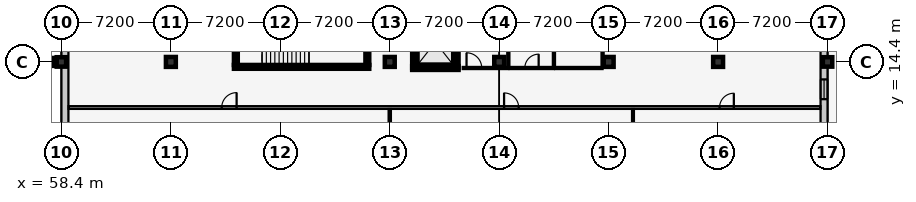
"""IFC4 building model, lengths in metres.
Left out: names, types, materials, properties, quantities, classifications, styles, units other than length and angle.
Written with IfcOpenShell. Run it as: python <this file> out.ifc"""

import sys

from ifc_helpers import new_model, si_unit, direction, frame, frame_2d, origin, origin_2d, place, context, subcontext, project, spatial, rectangle, extrude, element, fill, save


model = new_model("IFC4")
c1 = context("Model", 3, precision=1e-05, world=origin(), true_north=direction((0.0, 1.0)))
c2 = subcontext(c1, "Body", "Model", "MODEL_VIEW")
j1 = project(units=[si_unit("LENGTHUNIT", "METRE"), si_unit("PLANEANGLEUNIT", "RADIAN")], contexts=[c1])
p1 = place(None, origin())
s1 = spatial("IfcSite", under=j1, at=p1, CompositionType="ELEMENT")
p2 = place(p1, origin())
s2 = spatial("IfcBuilding", under=s1, at=p2, CompositionType="ELEMENT")
p3 = place(p2, frame((0.0, 0.0, 5.4)))
s3 = spatial("IfcBuildingStorey", under=s2, at=p3, CompositionType="ELEMENT", Elevation=5.4)
p4 = place(p3, frame((57.6, 14.4, 0.0), z_axis=(0.0, 0.0, 1.0), x_axis=(1.0, 0.0, 0.0)))
e1 = element("IfcColumn", 1, at=p4, inside=s3, PredefinedType="COLUMN", context=c2, shape_type="SweptSolid", body=[
    extrude(rectangle(XDim=0.52, YDim=0.52, at=origin_2d()), origin(), (0.0, 0.0, 1.0), 4.2),
])
p5 = place(p3, frame((58.4, 14.4, 0.0), z_axis=(0.0, 0.0, 1.0), x_axis=(1.0, 0.0, 0.0)))
e2 = element("IfcColumn", 2, at=p5, inside=s3, PredefinedType="COLUMN", context=c2, shape_type="SweptSolid", body=[
    extrude(rectangle(XDim=0.62, YDim=0.62, at=origin_2d()), origin(), (0.0, 0.0, 1.0), 4.2),
])
for number, where, z_axis, x_axis in (
    (3, (65.6, 14.4, 0.0), (0.0, 0.0, 1.0), (1.0, 0.0, 0.0)),
    (4, (80.0, 14.4, 0.0), (0.0, 0.0, 1.0), (1.0, 0.0, 0.0)),
    (5, (87.2, 14.4, 0.0), (0.0, 0.0, 1.0), (1.0, 0.0, 0.0)),
    (6, (94.4, 14.4, 0.0), (0.0, 0.0, 1.0), (1.0, 0.0, 0.0)),
    (7, (101.6, 14.4, 0.0), (0.0, 0.0, 1.0), (1.0, 0.0, 0.0)),
):
    element("IfcColumn", number, at=place(p3, frame(where, z_axis=z_axis, x_axis=x_axis)), inside=s3, PredefinedType="COLUMN", context=c2, shape_type="SweptSolid", body=[
        extrude(rectangle(XDim=0.65, YDim=0.65, at=origin_2d()), origin(), (0.0, 0.0, 1.0), 4.2),
    ])
p6 = place(p3, frame((108.8, 14.4, 0.0), z_axis=(0.0, 0.0, 1.0), x_axis=(1.0, 0.0, 0.0)))
e8 = element("IfcColumn", 8, at=p6, inside=s3, PredefinedType="COLUMN", context=c2, shape_type="SweptSolid", body=[
    extrude(rectangle(XDim=0.62, YDim=0.62, at=origin_2d()), origin(), (0.0, 0.0, 1.0), 4.2),
])
p7 = place(p3, frame((108.57, 21.6, 0.0), z_axis=(0.0, 0.0, 1.0), x_axis=(0.0, -1.0, 0.0)))
e9 = element("IfcWall", 9, at=p7, inside=s3, PredefinedType="SOLIDWALL", context=c2, shape_type="SweptSolid", body=[
    extrude(rectangle(XDim=21.6, YDim=0.46, at=frame_2d((10.8, 0.0))), origin(), (0.0, 0.0, 1.0), 3.215),
])
p8 = place(p7, frame((1.25, 0.0, 0.9)))
e10 = element("IfcOpeningElement", 10, at=p8, cuts=e9, PredefinedType="OPENING", context=c2, shape_type="SweptSolid", body=[
    extrude(rectangle(XDim=1.1, YDim=1.35, at=frame_2d((0.55, 0.675))), frame((0.0, 0.242, 0.0), z_axis=(0.0, -1.0, 0.0), x_axis=(1.0, 0.0, 0.0)), (0.0, 0.0, 1.0), 0.484),
])
p9 = place(p7, frame((4.8, 0.0, 0.9)))
e11 = element("IfcOpeningElement", 11, at=p9, cuts=e9, PredefinedType="OPENING", context=c2, shape_type="SweptSolid", body=[
    extrude(rectangle(XDim=1.2, YDim=1.35, at=frame_2d((0.6, 0.675))), frame((0.0, 0.242, 0.0), z_axis=(0.0, -1.0, 0.0), x_axis=(1.0, 0.0, 0.0)), (0.0, 0.0, 1.0), 0.484),
])
p10 = place(p7, frame((8.35, 0.0, 0.9)))
e12 = element("IfcOpeningElement", 12, at=p10, cuts=e9, PredefinedType="OPENING", context=c2, shape_type="SweptSolid", body=[
    extrude(rectangle(XDim=1.3, YDim=1.35, at=frame_2d((0.65, 0.675))), frame((0.0, 0.242, 0.0), z_axis=(0.0, -1.0, 0.0), x_axis=(1.0, 0.0, 0.0)), (0.0, 0.0, 1.0), 0.484),
])
p11 = place(p7, frame((11.9, 0.0, 0.9)))
e13 = element("IfcOpeningElement", 13, at=p11, cuts=e9, PredefinedType="OPENING", context=c2, shape_type="SweptSolid", body=[
    extrude(rectangle(XDim=1.4, YDim=1.35, at=frame_2d((0.7, 0.675))), frame((0.0, 0.242, 0.0), z_axis=(0.0, -1.0, 0.0), x_axis=(1.0, 0.0, 0.0)), (0.0, 0.0, 1.0), 0.484),
])
p12 = place(p7, frame((15.725, 0.0, 0.9)))
e14 = element("IfcOpeningElement", 14, at=p12, cuts=e9, PredefinedType="OPENING", context=c2, shape_type="SweptSolid", body=[
    extrude(rectangle(XDim=0.95, YDim=1.45, at=frame_2d((0.475, 0.725))), frame((0.0, 0.242, 0.0), z_axis=(0.0, -1.0, 0.0), x_axis=(1.0, 0.0, 0.0)), (0.0, 0.0, 1.0), 0.484),
])
p13 = place(p7, frame((19.275, 0.0, 0.9)))
e15 = element("IfcOpeningElement", 15, at=p13, cuts=e9, PredefinedType="OPENING", context=c2, shape_type="SweptSolid", body=[
    extrude(rectangle(XDim=1.05, YDim=1.45, at=frame_2d((0.525, 0.725))), frame((0.0, 0.242, 0.0), z_axis=(0.0, -1.0, 0.0), x_axis=(1.0, 0.0, 0.0)), (0.0, 0.0, 1.0), 0.484),
])
p14 = place(p3, frame((58.63, 0.0, 0.0), z_axis=(0.0, 0.0, 1.0), x_axis=(0.0, 1.0, 0.0)))
e16 = element("IfcWall", 16, at=p14, inside=s3, PredefinedType="SOLIDWALL", context=c2, shape_type="SweptSolid", body=[
    extrude(rectangle(XDim=21.6, YDim=0.46, at=frame_2d((10.8, 0.0))), origin(), (0.0, 0.0, 1.0), 3.205),
])
p15 = place(p14, frame((1.225, 0.0, 0.9)))
e17 = element("IfcOpeningElement", 17, at=p15, cuts=e16, PredefinedType="OPENING", context=c2, shape_type="SweptSolid", body=[
    extrude(rectangle(XDim=1.15, YDim=1.45, at=frame_2d((0.575, 0.725))), frame((0.0, 0.242, 0.0), z_axis=(0.0, -1.0, 0.0), x_axis=(1.0, 0.0, 0.0)), (0.0, 0.0, 1.0), 0.484),
])
p16 = place(p14, frame((4.775, 0.0, 0.9)))
e18 = element("IfcOpeningElement", 18, at=p16, cuts=e16, PredefinedType="OPENING", context=c2, shape_type="SweptSolid", body=[
    extrude(rectangle(XDim=1.25, YDim=1.45, at=frame_2d((0.625, 0.725))), frame((0.0, 0.242, 0.0), z_axis=(0.0, -1.0, 0.0), x_axis=(1.0, 0.0, 0.0)), (0.0, 0.0, 1.0), 0.484),
])
p17 = place(p14, frame((8.325, 0.0, 0.9)))
e19 = element("IfcOpeningElement", 19, at=p17, cuts=e16, PredefinedType="OPENING", context=c2, shape_type="SweptSolid", body=[
    extrude(rectangle(XDim=1.35, YDim=1.45, at=frame_2d((0.675, 0.725))), frame((0.0, 0.242, 0.0), z_axis=(0.0, -1.0, 0.0), x_axis=(1.0, 0.0, 0.0)), (0.0, 0.0, 1.0), 0.484),
])
p18 = place(p14, frame((15.75, 0.0, 0.9)))
e20 = element("IfcOpeningElement", 20, at=p18, cuts=e16, PredefinedType="OPENING", context=c2, shape_type="SweptSolid", body=[
    extrude(rectangle(XDim=0.9, YDim=1.6, at=frame_2d((0.45, 0.8))), frame((0.0, 0.242, 0.0), z_axis=(0.0, -1.0, 0.0), x_axis=(1.0, 0.0, 0.0)), (0.0, 0.0, 1.0), 0.484),
])
p19 = place(p14, frame((19.275, 0.0, 0.9)))
e21 = element("IfcOpeningElement", 21, at=p19, cuts=e16, PredefinedType="OPENING", context=c2, shape_type="SweptSolid", body=[
    extrude(rectangle(XDim=1.05, YDim=1.6, at=frame_2d((0.525, 0.8))), frame((0.0, 0.242, 0.0), z_axis=(0.0, -1.0, 0.0), x_axis=(1.0, 0.0, 0.0)), (0.0, 0.0, 1.0), 0.484),
])
p20 = place(p3, frame((69.75, 14.075, 0.0), z_axis=(0.0, 0.0, 1.0), x_axis=(1.0, 0.0, 0.0)))
e22 = element("IfcWall", 22, at=p20, inside=s3, PredefinedType="SHEAR", context=c2, shape_type="SweptSolid", body=[
    extrude(rectangle(XDim=8.9, YDim=0.25, at=frame_2d((4.45, 0.0))), origin(), (0.0, 0.0, 1.0), 3.95),
])
p21 = place(p3, frame((69.875, 17.65, 0.0), z_axis=(0.0, 0.0, 1.0), x_axis=(0.0, -1.0, 0.0)))
e23 = element("IfcWall", 23, at=p21, inside=s3, PredefinedType="SHEAR", context=c2, shape_type="SweptSolid", body=[
    extrude(rectangle(XDim=3.45, YDim=0.25, at=frame_2d((1.725, 0.0))), origin(), (0.0, 0.0, 1.0), 3.95),
])
p22 = place(p21, frame((1.15, 0.0, 0.0)))
e24 = element("IfcOpeningElement", 24, at=p22, cuts=e23, PredefinedType="OPENING", context=c2, shape_type="SweptSolid", body=[
    extrude(rectangle(XDim=1.15, YDim=2.15, at=frame_2d((0.575, 1.075))), frame((0.0, 0.137, 0.0), z_axis=(0.0, -1.0, 0.0), x_axis=(1.0, 0.0, 0.0)), (0.0, 0.0, 1.0), 0.274),
])
p23 = place(p3, frame((78.525, 14.2, 0.0), z_axis=(0.0, 0.0, 1.0), x_axis=(0.0, 1.0, 0.0)))
e25 = element("IfcWall", 25, at=p23, inside=s3, PredefinedType="SHEAR", context=c2, shape_type="SweptSolid", body=[
    extrude(rectangle(XDim=3.45, YDim=0.25, at=frame_2d((1.725, 0.0))), origin(), (0.0, 0.0, 1.0), 3.95),
])
p24 = place(p3, frame((81.475, 14.0, 0.0), z_axis=(0.0, 0.0, 1.0), x_axis=(1.0, 0.0, 0.0)))
e26 = element("IfcWall", 26, at=p24, inside=s3, PredefinedType="SHEAR", context=c2, shape_type="SweptSolid", body=[
    extrude(rectangle(XDim=3.05, YDim=0.25, at=frame_2d((1.525, 0.0))), origin(), (0.0, 0.0, 1.0), 3.95),
])
p25 = place(p24, frame((0.725, 0.0, 0.0)))
e27 = element("IfcOpeningElement", 27, at=p25, cuts=e26, PredefinedType="OPENING", context=c2, shape_type="SweptSolid", body=[
    extrude(rectangle(XDim=1.6, YDim=2.3, at=frame_2d((0.8, 1.15))), frame((0.0, 0.137, 0.0), z_axis=(0.0, -1.0, 0.0), x_axis=(1.0, 0.0, 0.0)), (0.0, 0.0, 1.0), 0.274),
])
for number, where, z_axis, x_axis in (
    (28, (81.6, 17.4, 0.0), (0.0, 0.0, 1.0), (0.0, -1.0, 0.0)),
    (29, (84.4, 14.0, 0.0), (0.0, 0.0, 1.0), (0.0, 1.0, 0.0)),
):
    element("IfcWall", number, at=place(p3, frame(where, z_axis=z_axis, x_axis=x_axis)), inside=s3, PredefinedType="SHEAR", context=c2, shape_type="SweptSolid", body=[
        extrude(rectangle(XDim=3.4, YDim=0.25, at=frame_2d((1.7, 0.0))), origin(), (0.0, 0.0, 1.0), 3.95),
    ])
p26 = place(p3, frame((58.87, 11.4, 0.0), z_axis=(0.0, 0.0, 1.0), x_axis=(1.0, 0.0, 0.0)))
e30 = element("IfcWall", 30, at=p26, inside=s3, PredefinedType="PARTITIONING", context=c2, shape_type="SweptSolid", body=[
    extrude(rectangle(XDim=49.46, YDim=0.18, at=frame_2d((24.73, 0.0))), origin(), (0.0, 0.0, 1.0), 3.95),
])
p27 = place(p26, frame((10.075, 0.0, 0.0)))
e31 = element("IfcOpeningElement", 31, at=p27, cuts=e30, PredefinedType="OPENING", context=c2, shape_type="SweptSolid", body=[
    extrude(rectangle(XDim=0.98, YDim=2.12, at=frame_2d((0.49, 1.06))), frame((0.0, 0.102, 0.0), z_axis=(0.0, -1.0, 0.0), x_axis=(1.0, 0.0, 0.0)), (0.0, 0.0, 1.0), 0.204),
])
p28 = place(p26, frame((28.65, 0.0, 0.0)))
e32 = element("IfcOpeningElement", 32, at=p28, cuts=e30, PredefinedType="OPENING", context=c2, shape_type="SweptSolid", body=[
    extrude(rectangle(XDim=0.96, YDim=2.1, at=frame_2d((0.48, 1.05))), frame((0.0, 0.102, 0.0), z_axis=(0.0, -1.0, 0.0), x_axis=(1.0, 0.0, 0.0)), (0.0, 0.0, 1.0), 0.204),
])
p29 = place(p26, frame((42.825, 0.0, 0.0)))
e33 = element("IfcOpeningElement", 33, at=p29, cuts=e30, PredefinedType="OPENING", context=c2, shape_type="SweptSolid", body=[
    extrude(rectangle(XDim=0.94, YDim=2.1, at=frame_2d((0.47, 1.05))), frame((0.0, 0.102, 0.0), z_axis=(0.0, -1.0, 0.0), x_axis=(1.0, 0.0, 0.0)), (0.0, 0.0, 1.0), 0.204),
])
p30 = place(p3, frame((80.0, 0.47, 0.0), z_axis=(0.0, 0.0, 1.0), x_axis=(0.0, 1.0, 0.0)))
e34 = element("IfcWall", 34, at=p30, inside=s3, PredefinedType="PARTITIONING", context=c2, shape_type="SweptSolid", body=[
    extrude(rectangle(XDim=10.83, YDim=0.15, at=frame_2d((5.415, 0.0))), origin(), (0.0, 0.0, 1.0), 3.325),
])
p31 = place(p3, frame((96.0, 0.47, 0.0), z_axis=(0.0, 0.0, 1.0), x_axis=(0.0, 1.0, 0.0)))
e35 = element("IfcWall", 35, at=p31, inside=s3, PredefinedType="PARTITIONING", context=c2, shape_type="SweptSolid", body=[
    extrude(rectangle(XDim=10.83, YDim=0.125, at=frame_2d((5.415, 0.0))), origin(), (0.0, 0.0, 1.0), 3.95),
])
p32 = place(p3, frame((84.8, 14.0, 0.0), z_axis=(0.0, 0.0, 1.0), x_axis=(1.0, 0.0, 0.0)))
e36 = element("IfcWall", 36, at=p32, inside=s3, PredefinedType="PARTITIONING", context=c2, shape_type="SweptSolid", body=[
    extrude(rectangle(XDim=3.0, YDim=0.14, at=frame_2d((1.5, 0.0))), origin(), (0.0, 0.0, 1.0), 3.95),
])
p33 = place(p32, frame((0.25, 0.0, 0.0)))
e37 = element("IfcOpeningElement", 37, at=p33, cuts=e36, PredefinedType="OPENING", context=c2, shape_type="SweptSolid", body=[
    extrude(rectangle(XDim=1.0, YDim=2.1, at=frame_2d((0.5, 1.05))), frame((0.0, 0.082, 0.0), z_axis=(0.0, -1.0, 0.0), x_axis=(1.0, 0.0, 0.0)), (0.0, 0.0, 1.0), 0.164),
])
p34 = place(p3, frame((87.8, 14.08, 0.0), z_axis=(0.0, 0.0, 1.0), x_axis=(0.0, 1.0, 0.0)))
e38 = element("IfcWall", 38, at=p34, inside=s3, PredefinedType="PARTITIONING", context=c2, shape_type="SweptSolid", body=[
    extrude(rectangle(XDim=7.105, YDim=0.14, at=frame_2d((3.552, 0.0))), origin(), (0.0, 0.0, 1.0), 3.95),
])
p35 = place(p3, frame((87.88, 14.0, 0.0), z_axis=(0.0, 0.0, 1.0), x_axis=(1.0, 0.0, 0.0)))
e39 = element("IfcWall", 39, at=p35, inside=s3, PredefinedType="PARTITIONING", context=c2, shape_type="SweptSolid", body=[
    extrude(rectangle(XDim=2.92, YDim=0.14, at=frame_2d((1.46, 0.0))), origin(), (0.0, 0.0, 1.0), 3.95),
])
p36 = place(p35, frame((1.005, 0.0, 0.0)))
e40 = element("IfcOpeningElement", 40, at=p36, cuts=e39, PredefinedType="OPENING", context=c2, shape_type="SweptSolid", body=[
    extrude(rectangle(XDim=0.91, YDim=2.06, at=frame_2d((0.455, 1.03))), frame((0.0, 0.082, 0.0), z_axis=(0.0, -1.0, 0.0), x_axis=(1.0, 0.0, 0.0)), (0.0, 0.0, 1.0), 0.164),
])
p37 = place(p3, frame((90.8, 14.08, 0.0), z_axis=(0.0, 0.0, 1.0), x_axis=(0.0, 1.0, 0.0)))
e41 = element("IfcWall", 41, at=p37, inside=s3, PredefinedType="PARTITIONING", context=c2, shape_type="SweptSolid", body=[
    extrude(rectangle(XDim=7.105, YDim=0.14, at=frame_2d((3.552, 0.0))), origin(), (0.0, 0.0, 1.0), 3.605),
])
p38 = place(p3, frame((90.88, 14.0, 0.0), z_axis=(0.0, 0.0, 1.0), x_axis=(1.0, 0.0, 0.0)))
e42 = element("IfcWall", 42, at=p38, inside=s3, PredefinedType="PARTITIONING", context=c2, shape_type="SweptSolid", body=[
    extrude(rectangle(XDim=3.12, YDim=0.14, at=frame_2d((1.56, 0.0))), origin(), (0.0, 0.0, 1.0), 3.95),
])
p39 = place(p3, frame((94.0, 14.08, 0.0), z_axis=(0.0, 0.0, 1.0), x_axis=(0.0, 1.0, 0.0)))
e43 = element("IfcWall", 43, at=p39, inside=s3, PredefinedType="PARTITIONING", context=c2, shape_type="SweptSolid", body=[
    extrude(rectangle(XDim=7.105, YDim=0.14, at=frame_2d((3.552, 0.0))), origin(), (0.0, 0.0, 1.0), 3.95),
])
p40 = place(p39, frame((3.107, 0.0, 0.0)))
e44 = element("IfcOpeningElement", 44, at=p40, cuts=e43, PredefinedType="OPENING", context=c2, shape_type="SweptSolid", body=[
    extrude(rectangle(XDim=0.89, YDim=2.05, at=frame_2d((0.445, 1.025))), frame((0.0, 0.082, 0.0), z_axis=(0.0, -1.0, 0.0), x_axis=(1.0, 0.0, 0.0)), (0.0, 0.0, 1.0), 0.164),
])
p41 = place(p10, origin())
e45 = element("IfcWindow", 45, at=p41, inside=s3, PartitioningType="SINGLE_PANEL", PredefinedType="WINDOW", context=c2, shape_type="SweptSolid", body=[
    extrude(rectangle(XDim=1.3, YDim=1.35, at=frame_2d((0.65, 0.675))), frame((0.0, 0.03, 0.0), z_axis=(0.0, -1.0, 0.0), x_axis=(1.0, 0.0, 0.0)), (0.0, 0.0, 1.0), 0.06),
])
fill(e12, e45)
p42 = place(p25, origin())
e46 = element("IfcDoor", 46, at=p42, inside=s3, OperationType="DOUBLE_DOOR_SLIDING", PredefinedType="DOOR", context=c2, shape_type="SweptSolid", body=[
    extrude(rectangle(XDim=1.6, YDim=2.3, at=frame_2d((0.8, 1.15))), frame((0.0, 0.025, 0.0), z_axis=(0.0, -1.0, 0.0), x_axis=(1.0, 0.0, 0.0)), (0.0, 0.0, 1.0), 0.05),
])
fill(e27, e46)
p43 = place(p27, origin())
e47 = element("IfcDoor", 47, at=p43, inside=s3, OperationType="SINGLE_SWING_RIGHT", PredefinedType="DOOR", context=c2, shape_type="SweptSolid", body=[
    extrude(rectangle(XDim=0.98, YDim=2.12, at=frame_2d((0.49, 1.06))), frame((0.0, 0.025, 0.0), z_axis=(0.0, -1.0, 0.0), x_axis=(1.0, 0.0, 0.0)), (0.0, 0.0, 1.0), 0.05),
])
fill(e31, e47)
p44 = place(p28, origin())
e48 = element("IfcDoor", 48, at=p44, inside=s3, OperationType="SINGLE_SWING_LEFT", PredefinedType="DOOR", context=c2, shape_type="SweptSolid", body=[
    extrude(rectangle(XDim=0.96, YDim=2.1, at=frame_2d((0.48, 1.05))), frame((0.0, 0.025, 0.0), z_axis=(0.0, -1.0, 0.0), x_axis=(1.0, 0.0, 0.0)), (0.0, 0.0, 1.0), 0.05),
])
fill(e32, e48)
p45 = place(p29, origin())
e49 = element("IfcDoor", 49, at=p45, inside=s3, OperationType="SINGLE_SWING_RIGHT", PredefinedType="DOOR", context=c2, shape_type="SweptSolid", body=[
    extrude(rectangle(XDim=0.94, YDim=2.1, at=frame_2d((0.47, 1.05))), frame((0.0, 0.025, 0.0), z_axis=(0.0, -1.0, 0.0), x_axis=(1.0, 0.0, 0.0)), (0.0, 0.0, 1.0), 0.05),
])
fill(e33, e49)
p46 = place(p33, origin())
e50 = element("IfcDoor", 50, at=p46, inside=s3, OperationType="SINGLE_SWING_LEFT", PredefinedType="DOOR", context=c2, shape_type="SweptSolid", body=[
    extrude(rectangle(XDim=1.0, YDim=2.1, at=frame_2d((0.5, 1.05))), frame((0.0, 0.025, 0.0), z_axis=(0.0, -1.0, 0.0), x_axis=(1.0, 0.0, 0.0)), (0.0, 0.0, 1.0), 0.05),
])
fill(e37, e50)
p47 = place(p36, origin())
e51 = element("IfcDoor", 51, at=p47, inside=s3, OperationType="SINGLE_SWING_RIGHT", PredefinedType="DOOR", context=c2, shape_type="SweptSolid", body=[
    extrude(rectangle(XDim=0.91, YDim=2.06, at=frame_2d((0.455, 1.03))), frame((0.0, 0.025, 0.0), z_axis=(0.0, -1.0, 0.0), x_axis=(1.0, 0.0, 0.0)), (0.0, 0.0, 1.0), 0.05),
])
fill(e40, e51)
save(model, sys.argv[1])
